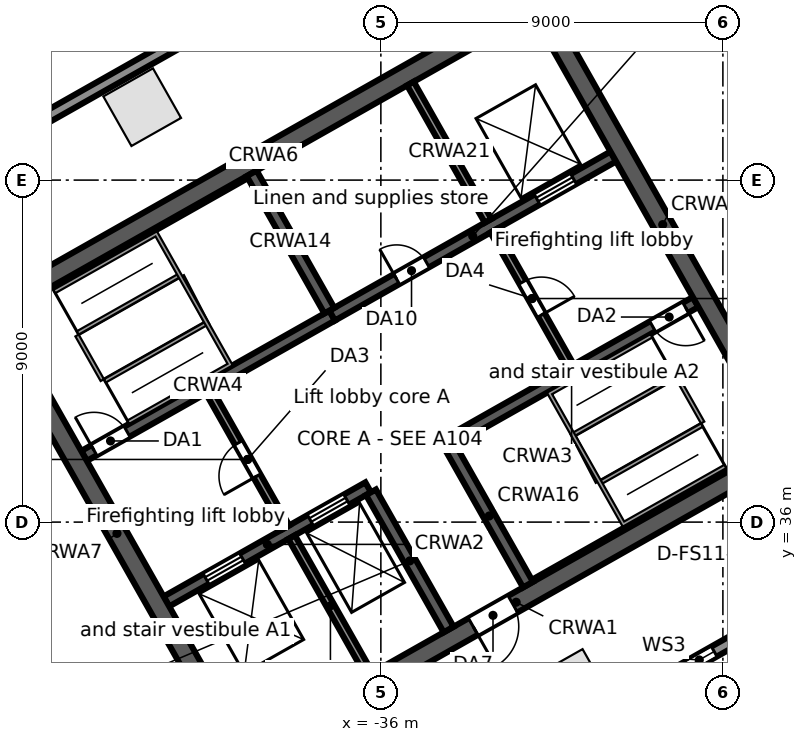
"""IFC4 building model, lengths in metres.
Left out: names, types, materials, properties, quantities, classifications, styles, units other than length and angle.
Written with IfcOpenShell. Run it as: python <this file> out.ifc"""

import sys

from ifc_helpers import new_model, si_unit, direction, frame, frame_2d, origin, origin_2d, place, context, subcontext, project, spatial, rectangle, extrude, element, fill, save


model = new_model("IFC4")
c1 = context("Model", 3, precision=1e-05, world=origin(), true_north=direction((0.0, 1.0)))
c2 = subcontext(c1, "Body", "Model", "MODEL_VIEW")
j1 = project(units=[si_unit("LENGTHUNIT", "METRE"), si_unit("PLANEANGLEUNIT", "RADIAN")], contexts=[c1])
p1 = place(None, origin())
s1 = spatial("IfcSite", under=j1, at=p1, CompositionType="ELEMENT")
p2 = place(p1, origin())
s2 = spatial("IfcBuilding", under=s1, at=p2, CompositionType="ELEMENT")
p3 = place(p2, frame((0.0, 0.0, 186.9)))
s3 = spatial("IfcBuildingStorey", under=s2, at=p3, CompositionType="ELEMENT", Elevation=186.9)
for number, where, z_axis, x_axis in (
    (1, (-42.28, 46.919, 0.0), (0.0, 0.0, 1.0), (-0.87, -0.492, 0.0)),
    (2, (-30.976, 31.635, 0.0), (0.0, 0.0, 1.0), (0.87, 0.492, 0.0)),
):
    element("IfcColumn", number, at=place(p3, frame(where, z_axis=z_axis, x_axis=x_axis)), inside=s3, PredefinedType="COLUMN", context=c2, shape_type="SweptSolid", body=[
        extrude(rectangle(XDim=1.5, YDim=1.5, at=origin_2d()), origin(), (0.0, 0.0, 1.0), 4.0),
    ])
p4 = place(p3, frame((-0.055, 47.969, 0.0), z_axis=(0.0, 0.0, 1.0), x_axis=(-0.870355730478, -0.492423499058, 0.0)))
e3 = element("IfcWall", 3, at=p4, inside=s3, PredefinedType="STANDARD", context=c2, shape_type="SweptSolid", body=[
    extrude(rectangle(XDim=43.75, YDim=0.3, at=frame_2d((21.875, 0.0))), origin(), (0.0, 0.0, 1.0), 3.68),
])
p5 = place(p4, frame((39.977, 0.0, 0.6)))
e4 = element("IfcOpeningElement", 4, at=p5, cuts=e3, PredefinedType="OPENING", context=c2, shape_type="SweptSolid", body=[
    extrude(rectangle(XDim=0.9, YDim=2.4, at=frame_2d((0.45, 1.2))), frame((0.0, 0.16, 0.0), z_axis=(0.0, -1.0, 0.0), x_axis=(1.0, 0.0, 0.0)), (0.0, 0.0, 1.0), 0.32),
])
p6 = place(p4, frame((37.338, 0.0, 0.0)))
e5 = element("IfcOpeningElement", 5, at=p6, cuts=e3, PredefinedType="OPENING", context=c2, shape_type="SweptSolid", body=[
    extrude(rectangle(XDim=1.8, YDim=2.4, at=frame_2d((0.9, 1.2))), frame((0.0, 0.16, 0.0), z_axis=(0.0, -1.0, 0.0), x_axis=(1.0, 0.0, 0.0)), (0.0, 0.0, 1.0), 0.32),
])
p7 = place(p4, frame((31.222, 0.0, 0.6)))
e6 = element("IfcOpeningElement", 6, at=p7, cuts=e3, PredefinedType="OPENING", context=c2, shape_type="SweptSolid", body=[
    extrude(rectangle(XDim=0.9, YDim=2.4, at=frame_2d((0.45, 1.2))), frame((0.0, 0.16, 0.0), z_axis=(0.0, -1.0, 0.0), x_axis=(1.0, 0.0, 0.0)), (0.0, 0.0, 1.0), 0.32),
])
p8 = place(p4, frame((28.584, 0.0, 0.0)))
e7 = element("IfcOpeningElement", 7, at=p8, cuts=e3, PredefinedType="OPENING", context=c2, shape_type="SweptSolid", body=[
    extrude(rectangle(XDim=1.8, YDim=2.4, at=frame_2d((0.9, 1.2))), frame((0.0, 0.16, 0.0), z_axis=(0.0, -1.0, 0.0), x_axis=(1.0, 0.0, 0.0)), (0.0, 0.0, 1.0), 0.32),
])
p9 = place(p4, frame((22.468, 0.0, 0.6)))
e8 = element("IfcOpeningElement", 8, at=p9, cuts=e3, PredefinedType="OPENING", context=c2, shape_type="SweptSolid", body=[
    extrude(rectangle(XDim=0.9, YDim=2.4, at=frame_2d((0.45, 1.2))), frame((0.0, 0.16, 0.0), z_axis=(0.0, -1.0, 0.0), x_axis=(1.0, 0.0, 0.0)), (0.0, 0.0, 1.0), 0.32),
])
p10 = place(p4, frame((19.829, 0.0, 0.0)))
e9 = element("IfcOpeningElement", 9, at=p10, cuts=e3, PredefinedType="OPENING", context=c2, shape_type="SweptSolid", body=[
    extrude(rectangle(XDim=1.8, YDim=2.4, at=frame_2d((0.9, 1.2))), frame((0.0, 0.16, 0.0), z_axis=(0.0, -1.0, 0.0), x_axis=(1.0, 0.0, 0.0)), (0.0, 0.0, 1.0), 0.32),
])
p11 = place(p4, frame((13.713, 0.0, 0.6)))
e10 = element("IfcOpeningElement", 10, at=p11, cuts=e3, PredefinedType="OPENING", context=c2, shape_type="SweptSolid", body=[
    extrude(rectangle(XDim=0.9, YDim=2.4, at=frame_2d((0.45, 1.2))), frame((0.0, 0.16, 0.0), z_axis=(0.0, -1.0, 0.0), x_axis=(1.0, 0.0, 0.0)), (0.0, 0.0, 1.0), 0.32),
])
p12 = place(p4, frame((11.075, 0.0, 0.0)))
e11 = element("IfcOpeningElement", 11, at=p12, cuts=e3, PredefinedType="OPENING", context=c2, shape_type="SweptSolid", body=[
    extrude(rectangle(XDim=1.8, YDim=2.4, at=frame_2d((0.9, 1.2))), frame((0.0, 0.16, 0.0), z_axis=(0.0, -1.0, 0.0), x_axis=(1.0, 0.0, 0.0)), (0.0, 0.0, 1.0), 0.32),
])
p13 = place(p4, frame((4.959, 0.0, 0.6)))
e12 = element("IfcOpeningElement", 12, at=p13, cuts=e3, PredefinedType="OPENING", context=c2, shape_type="SweptSolid", body=[
    extrude(rectangle(XDim=0.9, YDim=2.4, at=frame_2d((0.45, 1.2))), frame((0.0, 0.16, 0.0), z_axis=(0.0, -1.0, 0.0), x_axis=(1.0, 0.0, 0.0)), (0.0, 0.0, 1.0), 0.32),
])
p14 = place(p4, frame((2.32, 0.0, 0.0)))
e13 = element("IfcOpeningElement", 13, at=p14, cuts=e3, PredefinedType="OPENING", context=c2, shape_type="SweptSolid", body=[
    extrude(rectangle(XDim=1.8, YDim=2.4, at=frame_2d((0.9, 1.2))), frame((0.0, 0.16, 0.0), z_axis=(0.0, -1.0, 0.0), x_axis=(1.0, 0.0, 0.0)), (0.0, 0.0, 1.0), 0.32),
])
p15 = place(p3, frame((-58.745, 38.764, 0.0), z_axis=(0.0, 0.0, 1.0), x_axis=(0.870355811726, 0.492423355453, 0.0)))
e14 = element("IfcWall", 14, at=p15, inside=s3, PredefinedType="STANDARD", context=c2, shape_type="SweptSolid", body=[
    extrude(rectangle(XDim=64.025, YDim=0.3, at=frame_2d((32.013, 0.0))), origin(), (0.0, 0.0, 1.0), 3.68),
])
p16 = place(p15, frame((60.122, 0.0, 0.6)))
e15 = element("IfcOpeningElement", 15, at=p16, cuts=e14, PredefinedType="OPENING", context=c2, shape_type="SweptSolid", body=[
    extrude(rectangle(XDim=0.9, YDim=2.4, at=frame_2d((0.45, 1.2))), frame((0.0, 0.16, 0.0), z_axis=(0.0, -1.0, 0.0), x_axis=(1.0, 0.0, 0.0)), (0.0, 0.0, 1.0), 0.32),
])
p17 = place(p15, frame((50.992, 0.0, 0.6)))
e16 = element("IfcOpeningElement", 16, at=p17, cuts=e14, PredefinedType="OPENING", context=c2, shape_type="SweptSolid", body=[
    extrude(rectangle(XDim=0.9, YDim=2.4, at=frame_2d((0.45, 1.2))), frame((0.0, 0.16, 0.0), z_axis=(0.0, -1.0, 0.0), x_axis=(1.0, 0.0, 0.0)), (0.0, 0.0, 1.0), 0.32),
])
p18 = place(p15, frame((41.862, 0.0, 0.6)))
e17 = element("IfcOpeningElement", 17, at=p18, cuts=e14, PredefinedType="OPENING", context=c2, shape_type="SweptSolid", body=[
    extrude(rectangle(XDim=0.9, YDim=2.4, at=frame_2d((0.45, 1.2))), frame((0.0, 0.16, 0.0), z_axis=(0.0, -1.0, 0.0), x_axis=(1.0, 0.0, 0.0)), (0.0, 0.0, 1.0), 0.32),
])
p19 = place(p15, frame((32.732, 0.0, 0.6)))
e18 = element("IfcOpeningElement", 18, at=p19, cuts=e14, PredefinedType="OPENING", context=c2, shape_type="SweptSolid", body=[
    extrude(rectangle(XDim=0.9, YDim=2.4, at=frame_2d((0.45, 1.2))), frame((0.0, 0.16, 0.0), z_axis=(0.0, -1.0, 0.0), x_axis=(1.0, 0.0, 0.0)), (0.0, 0.0, 1.0), 0.32),
])
p20 = place(p15, frame((23.602, 0.0, 0.6)))
e19 = element("IfcOpeningElement", 19, at=p20, cuts=e14, PredefinedType="OPENING", context=c2, shape_type="SweptSolid", body=[
    extrude(rectangle(XDim=0.9, YDim=2.4, at=frame_2d((0.45, 1.2))), frame((0.0, 0.16, 0.0), z_axis=(0.0, -1.0, 0.0), x_axis=(1.0, 0.0, 0.0)), (0.0, 0.0, 1.0), 0.32),
])
p21 = place(p15, frame((14.472, 0.0, 0.6)))
e20 = element("IfcOpeningElement", 20, at=p21, cuts=e14, PredefinedType="OPENING", context=c2, shape_type="SweptSolid", body=[
    extrude(rectangle(XDim=0.9, YDim=2.4, at=frame_2d((0.45, 1.2))), frame((0.0, 0.16, 0.0), z_axis=(0.0, -1.0, 0.0), x_axis=(1.0, 0.0, 0.0)), (0.0, 0.0, 1.0), 0.32),
])
p22 = place(p15, frame((5.342, 0.0, 0.6)))
e21 = element("IfcOpeningElement", 21, at=p22, cuts=e14, PredefinedType="OPENING", context=c2, shape_type="SweptSolid", body=[
    extrude(rectangle(XDim=0.9, YDim=2.4, at=frame_2d((0.45, 1.2))), frame((0.0, 0.16, 0.0), z_axis=(0.0, -1.0, 0.0), x_axis=(1.0, 0.0, 0.0)), (0.0, 0.0, 1.0), 0.32),
])
p23 = place(p3, frame((-44.109, 26.504, 0.0), z_axis=(0.0, 0.0, 1.0), x_axis=(-0.857169502585, 0.515034410344, 0.0)))
e22 = element("IfcWall", 22, at=p23, inside=s3, PredefinedType="STANDARD", context=c2, shape_type="SweptSolid", body=[
    extrude(rectangle(XDim=17.127, YDim=0.3, at=frame_2d((8.563, 0.0))), origin(), (0.0, 0.0, 1.0), 3.68),
])
p24 = place(p23, frame((13.403, 0.0, 0.6)))
e23 = element("IfcOpeningElement", 23, at=p24, cuts=e22, PredefinedType="OPENING", context=c2, shape_type="SweptSolid", body=[
    extrude(rectangle(XDim=0.9, YDim=2.4, at=frame_2d((0.45, 1.2))), frame((0.0, 0.16, 0.0), z_axis=(0.0, -1.0, 0.0), x_axis=(1.0, 0.0, 0.0)), (0.0, 0.0, 1.0), 0.32),
])
p25 = place(p23, frame((4.903, 0.0, 0.6)))
e24 = element("IfcOpeningElement", 24, at=p25, cuts=e22, PredefinedType="OPENING", context=c2, shape_type="SweptSolid", body=[
    extrude(rectangle(XDim=0.9, YDim=2.4, at=frame_2d((0.45, 1.2))), frame((0.0, 0.16, 0.0), z_axis=(0.0, -1.0, 0.0), x_axis=(1.0, 0.0, 0.0)), (0.0, 0.0, 1.0), 0.32),
])
p26 = place(p3, frame((-39.838, 29.705, 0.0), z_axis=(0.0, 0.0, 1.0), x_axis=(0.870350116061, 0.492433422375, 0.0)))
e25 = element("IfcWall", 25, at=p26, inside=s3, PredefinedType="SOLIDWALL", context=c2, shape_type="SweptSolid", body=[
    extrude(rectangle(XDim=17.0, YDim=0.5, at=frame_2d((8.5, 0.0))), origin(), (0.0, 0.0, 1.0), 3.68),
])
p27 = place(p26, frame((7.2, 0.0, 0.0)))
e26 = element("IfcOpeningElement", 26, at=p27, cuts=e25, PredefinedType="OPENING", context=c2, shape_type="SweptSolid", body=[
    extrude(rectangle(XDim=1.2, YDim=2.1, at=frame_2d((0.6, 1.05))), frame((0.0, 0.26, 0.0), z_axis=(0.0, -1.0, 0.0), x_axis=(1.0, 0.0, 0.0)), (0.0, 0.0, 1.0), 0.52),
])
p28 = place(p3, frame((-41.643, 33.912, 0.0), z_axis=(0.0, 0.0, 1.0), x_axis=(0.870343599782, 0.492444939378, 0.0)))
e27 = element("IfcWall", 27, at=p28, inside=s3, PredefinedType="SOLIDWALL", context=c2, shape_type="SweptSolid", body=[
    extrude(rectangle(XDim=6.1, YDim=0.3, at=frame_2d((3.05, 0.0))), origin(), (0.0, 0.0, 1.0), 3.68),
])
p29 = place(p28, frame((1.2, 0.0, 0.0)))
e28 = element("IfcOpeningElement", 28, at=p29, cuts=e27, PredefinedType="OPENING", context=c2, shape_type="SweptSolid", body=[
    extrude(rectangle(XDim=1.1, YDim=2.1, at=frame_2d((0.55, 1.05))), frame((0.0, 0.16, 0.0), z_axis=(0.0, -1.0, 0.0), x_axis=(1.0, 0.0, 0.0)), (0.0, 0.0, 1.0), 0.32),
])
p30 = place(p28, frame((4.35, 0.0, 0.0)))
e29 = element("IfcOpeningElement", 29, at=p30, cuts=e27, PredefinedType="OPENING", context=c2, shape_type="SweptSolid", body=[
    extrude(rectangle(XDim=1.1, YDim=2.1, at=frame_2d((0.55, 1.05))), frame((0.0, 0.16, 0.0), z_axis=(0.0, -1.0, 0.0), x_axis=(1.0, 0.0, 0.0)), (0.0, 0.0, 1.0), 0.32),
])
p31 = place(p3, frame((-34.245, 38.097, 0.0), z_axis=(0.0, 0.0, 1.0), x_axis=(0.870364520461, 0.492407962489, 0.0)))
e30 = element("IfcWall", 30, at=p31, inside=s3, PredefinedType="SOLIDWALL", context=c2, shape_type="SweptSolid", body=[
    extrude(rectangle(XDim=7.5, YDim=0.3, at=frame_2d((3.75, 0.0))), origin(), (0.0, 0.0, 1.0), 3.68),
])
p32 = place(p31, frame((6.2, 0.0, 0.0)))
e31 = element("IfcOpeningElement", 31, at=p32, cuts=e30, PredefinedType="OPENING", context=c2, shape_type="SweptSolid", body=[
    extrude(rectangle(XDim=1.0, YDim=2.1, at=frame_2d((0.5, 1.05))), frame((0.0, 0.16, 0.0), z_axis=(0.0, -1.0, 0.0), x_axis=(1.0, 0.0, 0.0)), (0.0, 0.0, 1.0), 0.32),
])
p33 = place(p3, frame((-43.81, 37.741, 0.0), z_axis=(0.0, 0.0, 1.0), x_axis=(0.870350569555, 0.492432620848, 0.0)))
e32 = element("IfcWall", 32, at=p33, inside=s3, PredefinedType="SOLIDWALL", context=c2, shape_type="SweptSolid", body=[
    extrude(rectangle(XDim=7.5, YDim=0.3, at=frame_2d((3.75, 0.0))), origin(), (0.0, 0.0, 1.0), 3.68),
])
p34 = place(p33, frame((0.3, 0.0, 0.0)))
e33 = element("IfcOpeningElement", 33, at=p34, cuts=e32, PredefinedType="OPENING", context=c2, shape_type="SweptSolid", body=[
    extrude(rectangle(XDim=1.0, YDim=2.1, at=frame_2d((0.5, 1.05))), frame((0.0, 0.16, 0.0), z_axis=(0.0, -1.0, 0.0), x_axis=(1.0, 0.0, 0.0)), (0.0, 0.0, 1.0), 0.32),
])
p35 = place(p3, frame((-37.282, 41.435, 0.0), z_axis=(0.0, 0.0, 1.0), x_axis=(0.870356271124, 0.492422543467, 0.0)))
e34 = element("IfcWall", 34, at=p35, inside=s3, PredefinedType="SOLIDWALL", context=c2, shape_type="SweptSolid", body=[
    extrude(rectangle(XDim=8.5, YDim=0.3, at=frame_2d((4.25, 0.0))), origin(), (0.0, 0.0, 1.0), 3.68),
])
p36 = place(p35, frame((6.2, 0.0, 0.0)))
e35 = element("IfcOpeningElement", 35, at=p36, cuts=e34, PredefinedType="OPENING", context=c2, shape_type="SweptSolid", body=[
    extrude(rectangle(XDim=1.1, YDim=2.1, at=frame_2d((0.55, 1.05))), frame((0.0, 0.16, 0.0), z_axis=(0.0, -1.0, 0.0), x_axis=(1.0, 0.0, 0.0)), (0.0, 0.0, 1.0), 0.32),
])
p37 = place(p35, frame((1.95, 0.0, 0.0)))
e36 = element("IfcOpeningElement", 36, at=p37, cuts=e34, PredefinedType="OPENING", context=c2, shape_type="SweptSolid", body=[
    extrude(rectangle(XDim=0.9, YDim=2.1, at=frame_2d((0.45, 1.05))), frame((0.0, 0.16, 0.0), z_axis=(0.0, -1.0, 0.0), x_axis=(1.0, 0.0, 0.0)), (0.0, 0.0, 1.0), 0.32),
])
p38 = place(p3, frame((-46.486, 41.455, 0.0), z_axis=(0.0, 0.0, 1.0), x_axis=(0.870353598469, 0.492427267353, 0.0)))
e37 = element("IfcWall", 37, at=p38, inside=s3, PredefinedType="SOLIDWALL", context=c2, shape_type="SweptSolid", body=[
    extrude(rectangle(XDim=17.0, YDim=0.5, at=frame_2d((8.5, 0.0))), origin(), (0.0, 0.0, 1.0), 3.68),
])
p39 = place(p3, frame((-46.145, 41.361, 0.0), z_axis=(0.0, 0.0, 1.0), x_axis=(0.492435316254, -0.870349044525, 0.0)))
e38 = element("IfcWall", 38, at=p39, inside=s3, PredefinedType="SOLIDWALL", context=c2, shape_type="SweptSolid", body=[
    extrude(rectangle(XDim=13.0, YDim=0.5, at=frame_2d((6.5, 0.0))), origin(), (0.0, 0.0, 1.0), 3.68),
])
p40 = place(p3, frame((-38.349, 35.603, 0.0), z_axis=(0.0, 0.0, 1.0), x_axis=(0.492396453737, -0.870371031427, 0.0)))
e39 = element("IfcWall", 39, at=p40, inside=s3, PredefinedType="SOLIDWALL", context=c2, shape_type="SweptSolid", body=[
    extrude(rectangle(XDim=4.15, YDim=0.2, at=frame_2d((2.075, 0.0))), origin(), (0.0, 0.0, 1.0), 3.68),
])
p41 = place(p3, frame((-40.516, 39.433, 0.0), z_axis=(0.0, 0.0, 1.0), x_axis=(0.492453559952, -0.87033872216, 0.0)))
e40 = element("IfcWall", 40, at=p41, inside=s3, PredefinedType="PARTITIONING", context=c2, shape_type="SweptSolid", body=[
    extrude(rectangle(XDim=4.1, YDim=0.2, at=frame_2d((2.05, 0.0))), origin(), (0.0, 0.0, 1.0), 3.68),
])
p42 = place(p41, frame((1.55, 0.0, 0.0)))
e41 = element("IfcOpeningElement", 41, at=p42, cuts=e40, PredefinedType="OPENING", context=c2, shape_type="SweptSolid", body=[
    extrude(rectangle(XDim=1.0, YDim=2.1, at=frame_2d((0.5, 1.05))), frame((0.0, 0.11, 0.0), z_axis=(0.0, -1.0, 0.0), x_axis=(1.0, 0.0, 0.0)), (0.0, 0.0, 1.0), 0.22),
])
for number, where, z_axis, x_axis in (
    (42, (-36.26, 36.785, 0.0), (0.0, 0.0, 1.0), (0.492, -0.87, 0.0)),
    (43, (-39.399, 45.177, 0.0), (0.0, 0.0, 1.0), (0.492, -0.87, 0.0)),
    (44, (-34.171, 37.967, 0.0), (0.0, 0.0, 1.0), (0.492, -0.87, 0.0)),
):
    element("IfcWall", number, at=place(p3, frame(where, z_axis=z_axis, x_axis=x_axis)), inside=s3, PredefinedType="SOLIDWALL", context=c2, shape_type="SweptSolid", body=[
        extrude(rectangle(XDim=4.15, YDim=0.3, at=frame_2d((2.075, 0.0))), origin(), (0.0, 0.0, 1.0), 3.68),
    ])
p43 = place(p3, frame((-33.031, 43.667, 0.0), z_axis=(0.0, 0.0, 1.0), x_axis=(0.492408451753, -0.87036424366, 0.0)))
e45 = element("IfcWall", 45, at=p43, inside=s3, PredefinedType="PARTITIONING", context=c2, shape_type="SweptSolid", body=[
    extrude(rectangle(XDim=4.1, YDim=0.2, at=frame_2d((2.05, 0.0))), origin(), (0.0, 0.0, 1.0), 3.68),
])
p44 = place(p43, frame((1.55, 0.0, 0.0)))
e46 = element("IfcOpeningElement", 46, at=p44, cuts=e45, PredefinedType="OPENING", context=c2, shape_type="SweptSolid", body=[
    extrude(rectangle(XDim=1.0, YDim=2.1, at=frame_2d((0.5, 1.05))), frame((0.0, 0.11, 0.0), z_axis=(0.0, -1.0, 0.0), x_axis=(1.0, 0.0, 0.0)), (0.0, 0.0, 1.0), 0.22),
])
p45 = place(p3, frame((-35.222, 47.541, 0.0), z_axis=(0.0, 0.0, 1.0), x_axis=(0.492421666909, -0.870356767055, 0.0)))
e47 = element("IfcWall", 47, at=p45, inside=s3, PredefinedType="SOLIDWALL", context=c2, shape_type="SweptSolid", body=[
    extrude(rectangle(XDim=4.15, YDim=0.2, at=frame_2d((2.075, 0.0))), origin(), (0.0, 0.0, 1.0), 3.68),
])
p46 = place(p3, frame((-31.784, 49.486, 0.0), z_axis=(0.0, 0.0, 1.0), x_axis=(0.492435316254, -0.870349044525, 0.0)))
e48 = element("IfcWall", 48, at=p46, inside=s3, PredefinedType="SOLIDWALL", context=c2, shape_type="SweptSolid", body=[
    extrude(rectangle(XDim=13.0, YDim=0.5, at=frame_2d((6.5, 0.0))), origin(), (0.0, 0.0, 1.0), 3.68),
])
p47 = place(p3, frame((-28.799, 55.534, 0.0), z_axis=(0.0, 0.0, 1.0), x_axis=(0.488587464104, -0.872514922463, 0.0)))
e49 = element("IfcWall", 49, at=p47, inside=s3, PredefinedType="PARTITIONING", context=c2, shape_type="SweptSolid", body=[
    extrude(rectangle(XDim=17.295, YDim=0.125, at=frame_2d((8.647, 0.0))), origin(), (0.0, 0.0, 1.0), 2.852),
])
p48 = place(p7, origin())
e50 = element("IfcWindow", 50, at=p48, inside=s3, PartitioningType="SINGLE_PANEL", PredefinedType="WINDOW", context=c2, shape_type="SweptSolid", body=[
    extrude(rectangle(XDim=0.9, YDim=2.4, at=frame_2d((0.45, 1.2))), frame((0.0, 0.03, 0.0), z_axis=(0.0, -1.0, 0.0), x_axis=(1.0, 0.0, 0.0)), (0.0, 0.0, 1.0), 0.06),
])
fill(e6, e50)
p49 = place(p36, origin())
e51 = element("IfcDoor", 51, at=p49, inside=s3, OperationType="DOUBLE_DOOR_SLIDING", PredefinedType="DOOR", context=c2, shape_type="SweptSolid", body=[
    extrude(rectangle(XDim=1.1, YDim=2.1, at=frame_2d((0.55, 1.05))), frame((0.0, 0.025, 0.0), z_axis=(0.0, -1.0, 0.0), x_axis=(1.0, 0.0, 0.0)), (0.0, 0.0, 1.0), 0.05),
])
fill(e35, e51)
p50 = place(p29, origin())
e52 = element("IfcDoor", 52, at=p50, inside=s3, OperationType="DOUBLE_DOOR_SLIDING", PredefinedType="DOOR", context=c2, shape_type="SweptSolid", body=[
    extrude(rectangle(XDim=1.1, YDim=2.1, at=frame_2d((0.55, 1.05))), frame((0.0, 0.025, 0.0), z_axis=(0.0, -1.0, 0.0), x_axis=(1.0, 0.0, 0.0)), (0.0, 0.0, 1.0), 0.05),
])
fill(e28, e52)
p51 = place(p30, origin())
e53 = element("IfcDoor", 53, at=p51, inside=s3, OperationType="DOUBLE_DOOR_SLIDING", PredefinedType="DOOR", context=c2, shape_type="SweptSolid", body=[
    extrude(rectangle(XDim=1.1, YDim=2.1, at=frame_2d((0.55, 1.05))), frame((0.0, 0.025, 0.0), z_axis=(0.0, -1.0, 0.0), x_axis=(1.0, 0.0, 0.0)), (0.0, 0.0, 1.0), 0.05),
])
fill(e29, e53)
p52 = place(p34, origin())
e54 = element("IfcDoor", 54, at=p52, inside=s3, OperationType="SINGLE_SWING_LEFT", PredefinedType="DOOR", context=c2, shape_type="SweptSolid", body=[
    extrude(rectangle(XDim=1.0, YDim=2.1, at=frame_2d((0.5, 1.05))), frame((0.0, 0.025, 0.0), z_axis=(0.0, -1.0, 0.0), x_axis=(1.0, 0.0, 0.0)), (0.0, 0.0, 1.0), 0.05),
])
fill(e33, e54)
p53 = place(p32, frame((1.0, 0.0, 0.0), z_axis=(0.0, 0.0, 1.0), x_axis=(-1.0, 0.0, 0.0)))
e55 = element("IfcDoor", 55, at=p53, inside=s3, OperationType="SINGLE_SWING_LEFT", PredefinedType="DOOR", context=c2, shape_type="SweptSolid", body=[
    extrude(rectangle(XDim=1.0, YDim=2.1, at=frame_2d((0.5, 1.05))), frame((0.0, 0.025, 0.0), z_axis=(0.0, -1.0, 0.0), x_axis=(1.0, 0.0, 0.0)), (0.0, 0.0, 1.0), 0.05),
])
fill(e31, e55)
p54 = place(p42, frame((1.0, 0.0, 0.0), z_axis=(0.0, 0.0, 1.0), x_axis=(-1.0, 0.0, 0.0)))
e56 = element("IfcDoor", 56, at=p54, inside=s3, OperationType="SINGLE_SWING_LEFT", PredefinedType="DOOR", context=c2, shape_type="SweptSolid", body=[
    extrude(rectangle(XDim=1.0, YDim=2.1, at=frame_2d((0.5, 1.05))), frame((0.0, 0.025, 0.0), z_axis=(0.0, -1.0, 0.0), x_axis=(1.0, 0.0, 0.0)), (0.0, 0.0, 1.0), 0.05),
])
fill(e41, e56)
p55 = place(p44, origin())
e57 = element("IfcDoor", 57, at=p55, inside=s3, OperationType="SINGLE_SWING_RIGHT", PredefinedType="DOOR", context=c2, shape_type="SweptSolid", body=[
    extrude(rectangle(XDim=1.0, YDim=2.1, at=frame_2d((0.5, 1.05))), frame((0.0, 0.025, 0.0), z_axis=(0.0, -1.0, 0.0), x_axis=(1.0, 0.0, 0.0)), (0.0, 0.0, 1.0), 0.05),
])
fill(e46, e57)
p56 = place(p27, frame((1.2, 0.0, 0.0), z_axis=(0.0, 0.0, 1.0), x_axis=(-1.0, 0.0, 0.0)))
e58 = element("IfcDoor", 58, at=p56, inside=s3, OperationType="SINGLE_SWING_RIGHT", PredefinedType="DOOR", context=c2, shape_type="SweptSolid", body=[
    extrude(rectangle(XDim=1.2, YDim=2.1, at=frame_2d((0.6, 1.05))), frame((0.0, 0.025, 0.0), z_axis=(0.0, -1.0, 0.0), x_axis=(1.0, 0.0, 0.0)), (0.0, 0.0, 1.0), 0.05),
])
fill(e26, e58)
p57 = place(p37, origin())
e59 = element("IfcDoor", 59, at=p57, inside=s3, OperationType="SINGLE_SWING_LEFT", PredefinedType="DOOR", context=c2, shape_type="SweptSolid", body=[
    extrude(rectangle(XDim=0.9, YDim=2.1, at=frame_2d((0.45, 1.05))), frame((0.0, 0.025, 0.0), z_axis=(0.0, -1.0, 0.0), x_axis=(1.0, 0.0, 0.0)), (0.0, 0.0, 1.0), 0.05),
])
fill(e36, e59)
save(model, sys.argv[1])
